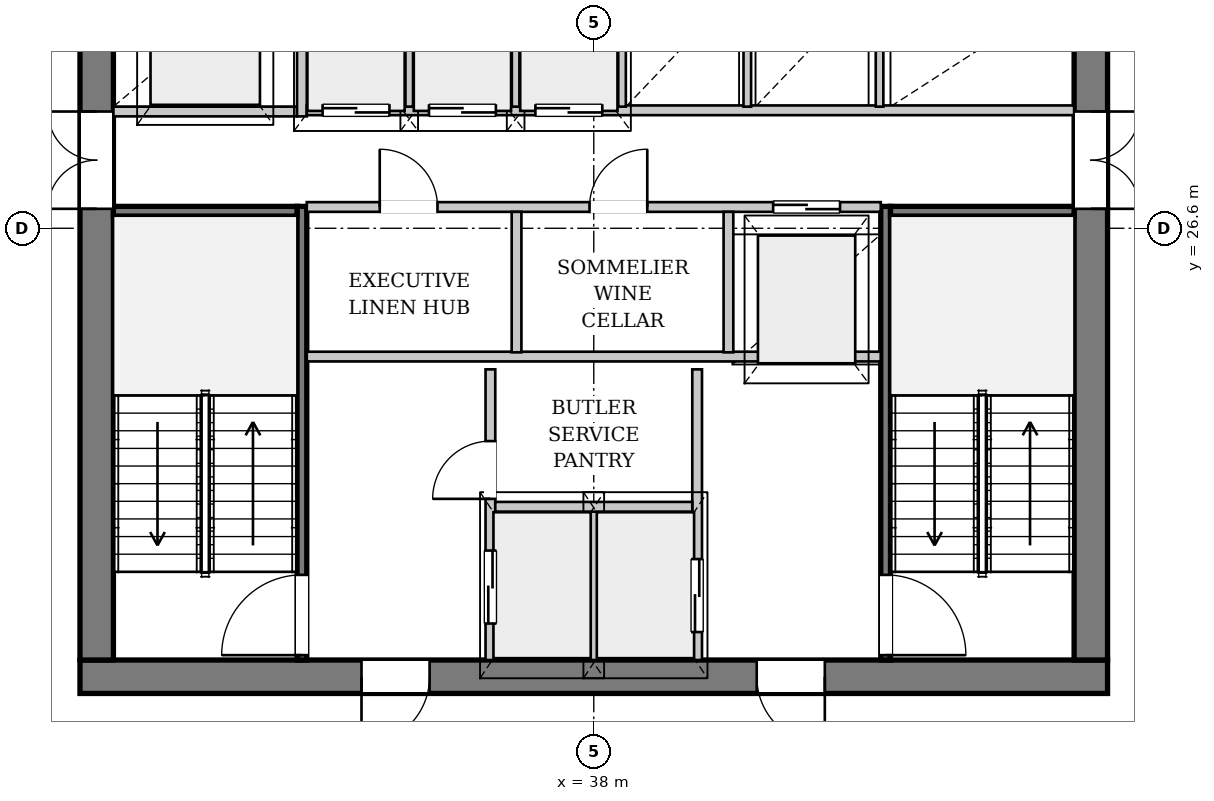
"""IFC4 building model, lengths in metres.
Left out: names, types, materials, properties, quantities, classifications, styles, units other than length and angle.
Written with IfcOpenShell. Run it as: python <this file> out.ifc"""

import sys

from ifc_helpers import new_model, si_unit, direction, frame, frame_2d, origin, place, context, subcontext, project, spatial, rectangle, extrude, source, transform, mapped, element, fill, save


model = new_model("IFC4")
c1 = context("Model", 3, precision=1e-05, world=origin(), true_north=direction((0.0, 1.0)))
c2 = subcontext(c1, "Body", "Model", "MODEL_VIEW")
j1 = project(units=[si_unit("LENGTHUNIT", "METRE"), si_unit("PLANEANGLEUNIT", "RADIAN")], contexts=[c1])
p1 = place(None, origin())
s1 = spatial("IfcSite", under=j1, at=p1, CompositionType="ELEMENT")
p2 = place(p1, origin())
s2 = spatial("IfcBuilding", under=s1, at=p2, CompositionType="ELEMENT")
p3 = place(p2, frame((0.0, 0.0, 167.9)))
s3 = spatial("IfcBuildingStorey", under=s2, at=p3, CompositionType="ELEMENT", Elevation=167.9)
p4 = place(p3, frame((52.97, 20.198, 0.0), z_axis=(0.0, 0.0, 1.0), x_axis=(-0.656914851648, -0.753964772177, 0.0)))
e1 = element("IfcWall", 1, at=p4, inside=s3, PredefinedType="SOLIDWALL", context=c2, shape_type="SweptSolid", body=[
    extrude(rectangle(XDim=23.44, YDim=0.32, at=frame_2d((11.72, 0.0))), origin(), (0.0, 0.0, 1.0), 2.722),
])
p5 = place(p4, frame((6.751, 0.0, 0.0)))
e2 = element("IfcOpeningElement", 2, at=p5, cuts=e1, PredefinedType="OPENING", context=c2, shape_type="SweptSolid", body=[
    extrude(rectangle(XDim=1.5, YDim=2.3, at=frame_2d((0.75, 1.15))), frame((0.0, 0.17, 0.0), z_axis=(0.0, -1.0, 0.0), x_axis=(1.0, 0.0, 0.0)), (0.0, 0.0, 1.0), 0.34),
])
p6 = place(p4, frame((17.646, 0.0, 0.252)))
e3 = element("IfcOpeningElement", 3, at=p6, cuts=e1, PredefinedType="OPENING", context=c2, shape_type="SweptSolid", body=[
    extrude(rectangle(XDim=2.6, YDim=2.35, at=frame_2d((1.3, 1.175))), frame((0.0, 0.17, 0.0), z_axis=(0.0, -1.0, 0.0), x_axis=(1.0, 0.0, 0.0)), (0.0, 0.0, 1.0), 0.34),
])
p7 = place(p3, frame((46.45, 19.225, 0.0), z_axis=(0.0, 0.0, 1.0), x_axis=(-1.0, 0.0, 0.0)))
e4 = element("IfcWall", 4, at=p7, inside=s3, PredefinedType="SHEAR", context=c2, shape_type="SweptSolid", body=[
    extrude(rectangle(XDim=16.9, YDim=0.55, at=frame_2d((8.45, 0.0))), origin(), (0.0, 0.0, 1.0), 3.33),
])
p8 = place(p7, frame((4.65, 0.0, 0.0)))
e5 = element("IfcOpeningElement", 5, at=p8, cuts=e4, PredefinedType="OPENING", context=c2, shape_type="SweptSolid", body=[
    extrude(rectangle(XDim=1.12, YDim=2.25, at=frame_2d((0.56, 1.125))), frame((0.0, 0.285, 0.0), z_axis=(0.0, -1.0, 0.0), x_axis=(1.0, 0.0, 0.0)), (0.0, 0.0, 1.0), 0.57),
])
p9 = place(p7, frame((11.15, 0.0, 0.0)))
e6 = element("IfcOpeningElement", 6, at=p9, cuts=e4, PredefinedType="OPENING", context=c2, shape_type="SweptSolid", body=[
    extrude(rectangle(XDim=1.12, YDim=2.25, at=frame_2d((0.56, 1.125))), frame((0.0, 0.285, 0.0), z_axis=(0.0, -1.0, 0.0), x_axis=(1.0, 0.0, 0.0)), (0.0, 0.0, 1.0), 0.57),
])
p10 = place(p3, frame((29.825, 19.5, 0.0), z_axis=(0.0, 0.0, 1.0), x_axis=(0.0, 1.0, 0.0)))
e7 = element("IfcWall", 7, at=p10, inside=s3, PredefinedType="SHEAR", context=c2, shape_type="SweptSolid", body=[
    extrude(rectangle(XDim=14.2, YDim=0.55, at=frame_2d((7.1, 0.0))), origin(), (0.0, 0.0, 1.0), 3.33),
])
p11 = place(p10, frame((7.42, 0.0, 0.0)))
e8 = element("IfcOpeningElement", 8, at=p11, cuts=e7, PredefinedType="OPENING", context=c2, shape_type="SweptSolid", body=[
    extrude(rectangle(XDim=1.6, YDim=2.2, at=frame_2d((0.8, 1.1))), frame((0.0, 0.285, 0.0), z_axis=(0.0, -1.0, 0.0), x_axis=(1.0, 0.0, 0.0)), (0.0, 0.0, 1.0), 0.57),
])
p12 = place(p3, frame((46.175, 33.7, 0.0), z_axis=(0.0, 0.0, 1.0), x_axis=(0.0, -1.0, 0.0)))
e9 = element("IfcWall", 9, at=p12, inside=s3, PredefinedType="SHEAR", context=c2, shape_type="SweptSolid", body=[
    extrude(rectangle(XDim=14.2, YDim=0.55, at=frame_2d((7.1, 0.0))), origin(), (0.0, 0.0, 1.0), 3.33),
])
p13 = place(p12, frame((5.18, 0.0, 0.0)))
e10 = element("IfcOpeningElement", 10, at=p13, cuts=e9, PredefinedType="OPENING", context=c2, shape_type="SweptSolid", body=[
    extrude(rectangle(XDim=1.6, YDim=2.2, at=frame_2d((0.8, 1.1))), frame((0.0, 0.285, 0.0), z_axis=(0.0, -1.0, 0.0), x_axis=(1.0, 0.0, 0.0)), (0.0, 0.0, 1.0), 0.57),
])
p14 = place(p12, frame((2.05, 0.0, 0.0)))
e11 = element("IfcOpeningElement", 11, at=p14, cuts=e9, PredefinedType="OPENING", context=c2, shape_type="SweptSolid", body=[
    extrude(rectangle(XDim=0.95, YDim=2.1, at=frame_2d((0.475, 1.05))), frame((0.0, 0.285, 0.0), z_axis=(0.0, -1.0, 0.0), x_axis=(1.0, 0.0, 0.0)), (0.0, 0.0, 1.0), 0.57),
])
p15 = place(p3, frame((33.2, 19.5, 0.0), z_axis=(0.0, 0.0, 1.0), x_axis=(0.0, 1.0, 0.0)))
e12 = element("IfcWall", 12, at=p15, inside=s3, PredefinedType="PARTITIONING", context=c2, shape_type="SweptSolid", body=[
    extrude(rectangle(XDim=7.46, YDim=0.16, at=frame_2d((3.73, 0.0))), origin(), (0.0, 0.0, 1.0), 3.33),
])
p16 = place(p15, frame((0.08, 0.0, 0.0)))
e13 = element("IfcOpeningElement", 13, at=p16, cuts=e12, PredefinedType="OPENING", context=c2, shape_type="SweptSolid", body=[
    extrude(rectangle(XDim=1.32, YDim=2.2, at=frame_2d((0.66, 1.1))), frame((0.0, 0.09, 0.0), z_axis=(0.0, -1.0, 0.0), x_axis=(1.0, 0.0, 0.0)), (0.0, 0.0, 1.0), 0.18),
])
p17 = place(p3, frame((30.1, 26.88, 0.0), z_axis=(0.0, 0.0, 1.0), x_axis=(1.0, 0.0, 0.0)))
e14 = element("IfcWall", 14, at=p17, inside=s3, PredefinedType="PARTITIONING", context=c2, shape_type="SweptSolid", body=[
    extrude(rectangle(XDim=3.02, YDim=0.16, at=frame_2d((1.51, 0.0))), origin(), (0.0, 0.0, 1.0), 3.33),
])
p18 = place(p3, frame((42.8, 26.96, 0.0), z_axis=(0.0, 0.0, 1.0), x_axis=(0.0, -1.0, 0.0)))
e15 = element("IfcWall", 15, at=p18, inside=s3, PredefinedType="PARTITIONING", context=c2, shape_type="SweptSolid", body=[
    extrude(rectangle(XDim=7.46, YDim=0.16, at=frame_2d((3.73, 0.0))), origin(), (0.0, 0.0, 1.0), 3.33),
])
p19 = place(p18, frame((6.06, 0.0, 0.0)))
e16 = element("IfcOpeningElement", 16, at=p19, cuts=e15, PredefinedType="OPENING", context=c2, shape_type="SweptSolid", body=[
    extrude(rectangle(XDim=1.32, YDim=2.2, at=frame_2d((0.66, 1.1))), frame((0.0, 0.09, 0.0), z_axis=(0.0, -1.0, 0.0), x_axis=(1.0, 0.0, 0.0)), (0.0, 0.0, 1.0), 0.18),
])
p20 = place(p3, frame((42.88, 26.88, 0.0), z_axis=(0.0, 0.0, 1.0), x_axis=(1.0, 0.0, 0.0)))
e17 = element("IfcWall", 17, at=p20, inside=s3, PredefinedType="PARTITIONING", context=c2, shape_type="SweptSolid", body=[
    extrude(rectangle(XDim=3.02, YDim=0.16, at=frame_2d((1.51, 0.0))), origin(), (0.0, 0.0, 1.0), 3.33),
])
p21 = place(p3, frame((36.3, 19.5, 0.0), z_axis=(0.0, 0.0, 1.0), x_axis=(0.0, 1.0, 0.0)))
e18 = element("IfcWall", 18, at=p21, inside=s3, PredefinedType="PARTITIONING", context=c2, shape_type="SweptSolid", body=[
    extrude(rectangle(XDim=4.78, YDim=0.16, at=frame_2d((2.39, 0.0))), origin(), (0.0, 0.0, 1.0), 3.33),
])
p22 = place(p21, frame((0.6, 0.0, 0.0)))
e19 = element("IfcOpeningElement", 19, at=p22, cuts=e18, PredefinedType="OPENING", context=c2, shape_type="SweptSolid", body=[
    extrude(rectangle(XDim=1.2, YDim=2.2, at=frame_2d((0.6, 1.1))), frame((0.0, 0.09, 0.0), z_axis=(0.0, -1.0, 0.0), x_axis=(1.0, 0.0, 0.0)), (0.0, 0.0, 1.0), 0.18),
])
p23 = place(p21, frame((2.65, 0.0, 0.0)))
e20 = element("IfcOpeningElement", 20, at=p23, cuts=e18, PredefinedType="OPENING", context=c2, shape_type="SweptSolid", body=[
    extrude(rectangle(XDim=0.95, YDim=2.1, at=frame_2d((0.475, 1.05))), frame((0.0, 0.09, 0.0), z_axis=(0.0, -1.0, 0.0), x_axis=(1.0, 0.0, 0.0)), (0.0, 0.0, 1.0), 0.18),
])
p24 = place(p3, frame((39.7, 24.28, 0.0), z_axis=(0.0, 0.0, 1.0), x_axis=(0.0, -1.0, 0.0)))
e21 = element("IfcWall", 21, at=p24, inside=s3, PredefinedType="PARTITIONING", context=c2, shape_type="SweptSolid", body=[
    extrude(rectangle(XDim=4.78, YDim=0.16, at=frame_2d((2.39, 0.0))), origin(), (0.0, 0.0, 1.0), 3.33),
])
p25 = place(p24, frame((3.12, 0.0, 0.0)))
e22 = element("IfcOpeningElement", 22, at=p25, cuts=e21, PredefinedType="OPENING", context=c2, shape_type="SweptSolid", body=[
    extrude(rectangle(XDim=1.2, YDim=2.2, at=frame_2d((0.6, 1.1))), frame((0.0, 0.09, 0.0), z_axis=(0.0, -1.0, 0.0), x_axis=(1.0, 0.0, 0.0)), (0.0, 0.0, 1.0), 0.18),
])
p26 = place(p3, frame((38.0, 19.5, 0.0), z_axis=(0.0, 0.0, 1.0), x_axis=(0.0, 1.0, 0.0)))
e23 = element("IfcWall", 23, at=p26, inside=s3, PredefinedType="PARTITIONING", context=c2, shape_type="SweptSolid", body=[
    extrude(rectangle(XDim=2.46, YDim=0.125, at=frame_2d((1.23, 0.0))), origin(), (0.0, 0.0, 1.0), 3.33),
])
p27 = place(p3, frame((36.38, 22.02, 0.0), z_axis=(0.0, 0.0, 1.0), x_axis=(1.0, 0.0, 0.0)))
e24 = element("IfcWall", 24, at=p27, inside=s3, PredefinedType="PARTITIONING", context=c2, shape_type="SweptSolid", body=[
    extrude(rectangle(XDim=3.24, YDim=0.16, at=frame_2d((1.62, 0.0))), origin(), (0.0, 0.0, 1.0), 3.33),
])
p28 = place(p3, frame((33.28, 24.49, 0.0), z_axis=(0.0, 0.0, 1.0), x_axis=(1.0, 0.0, 0.0)))
e25 = element("IfcWall", 25, at=p28, inside=s3, PredefinedType="PARTITIONING", context=c2, shape_type="SweptSolid", body=[
    extrude(rectangle(XDim=9.44, YDim=0.16, at=frame_2d((4.72, 0.0))), origin(), (0.0, 0.0, 1.0), 3.33),
])
p29 = place(p3, frame((30.1, 28.52, 0.0), z_axis=(0.0, 0.0, 1.0), x_axis=(1.0, 0.0, 0.0)))
e26 = element("IfcWall", 26, at=p29, inside=s3, PredefinedType="PARTITIONING", context=c2, shape_type="SweptSolid", body=[
    extrude(rectangle(XDim=3.02, YDim=0.16, at=frame_2d((1.51, 0.0))), origin(), (0.0, 0.0, 1.0), 3.33),
])
p30 = place(p3, frame((33.2, 28.44, 0.0), z_axis=(0.0, 0.0, 1.0), x_axis=(0.0, 1.0, 0.0)))
e27 = element("IfcWall", 27, at=p30, inside=s3, PredefinedType="PARTITIONING", context=c2, shape_type="SweptSolid", body=[
    extrude(rectangle(XDim=5.26, YDim=0.16, at=frame_2d((2.63, 0.0))), origin(), (0.0, 0.0, 1.0), 3.33),
])
p31 = place(p3, frame((33.28, 26.95, 0.0), z_axis=(0.0, 0.0, 1.0), x_axis=(1.0, 0.0, 0.0)))
e28 = element("IfcWall", 28, at=p31, inside=s3, PredefinedType="PARTITIONING", context=c2, shape_type="SweptSolid", body=[
    extrude(rectangle(XDim=9.44, YDim=0.16, at=frame_2d((4.72, 0.0))), origin(), (0.0, 0.0, 1.0), 3.33),
])
p32 = place(p31, frame((1.2, 0.0, 0.0)))
e29 = element("IfcOpeningElement", 29, at=p32, cuts=e28, PredefinedType="OPENING", context=c2, shape_type="SweptSolid", body=[
    extrude(rectangle(XDim=0.95, YDim=2.1, at=frame_2d((0.475, 1.05))), frame((0.0, 0.09, 0.0), z_axis=(0.0, -1.0, 0.0), x_axis=(1.0, 0.0, 0.0)), (0.0, 0.0, 1.0), 0.18),
])
p33 = place(p31, frame((4.65, 0.0, 0.0)))
e30 = element("IfcOpeningElement", 30, at=p33, cuts=e28, PredefinedType="OPENING", context=c2, shape_type="SweptSolid", body=[
    extrude(rectangle(XDim=0.95, YDim=2.1, at=frame_2d((0.475, 1.05))), frame((0.0, 0.09, 0.0), z_axis=(0.0, -1.0, 0.0), x_axis=(1.0, 0.0, 0.0)), (0.0, 0.0, 1.0), 0.18),
])
p34 = place(p31, frame((7.67, 0.0, 0.0)))
e31 = element("IfcOpeningElement", 31, at=p34, cuts=e28, PredefinedType="OPENING", context=c2, shape_type="SweptSolid", body=[
    extrude(rectangle(XDim=1.1, YDim=2.2, at=frame_2d((0.55, 1.1))), frame((0.0, 0.09, 0.0), z_axis=(0.0, -1.0, 0.0), x_axis=(1.0, 0.0, 0.0)), (0.0, 0.0, 1.0), 0.18),
])
for number, where, z_axis, x_axis in (
    (32, (36.73, 24.56, 0.0), (0.0, 0.0, 1.0), (0.0, 1.0, 0.0)),
    (33, (40.215, 24.56, 0.0), (0.0, 0.0, 1.0), (0.0, 1.0, 0.0)),
):
    element("IfcWall", number, at=place(p3, frame(where, z_axis=z_axis, x_axis=x_axis)), inside=s3, PredefinedType="PARTITIONING", context=c2, shape_type="SweptSolid", body=[
        extrude(rectangle(XDim=2.31, YDim=0.16, at=frame_2d((1.155, 0.0))), origin(), (0.0, 0.0, 1.0), 3.33),
    ])
p35 = place(p3, frame((33.28, 28.54, 0.0), z_axis=(0.0, 0.0, 1.0), x_axis=(1.0, 0.0, 0.0)))
e34 = element("IfcWall", 34, at=p35, inside=s3, PredefinedType="PARTITIONING", context=c2, shape_type="SweptSolid", body=[
    extrude(rectangle(XDim=12.62, YDim=0.16, at=frame_2d((6.31, 0.0))), origin(), (0.0, 0.0, 1.0), 3.33),
])
p36 = place(p35, frame((0.26, 0.0, 0.0)))
e35 = element("IfcOpeningElement", 35, at=p36, cuts=e34, PredefinedType="OPENING", context=c2, shape_type="SweptSolid", body=[
    extrude(rectangle(XDim=1.1, YDim=2.2, at=frame_2d((0.55, 1.1))), frame((0.0, 0.09, 0.0), z_axis=(0.0, -1.0, 0.0), x_axis=(1.0, 0.0, 0.0)), (0.0, 0.0, 1.0), 0.18),
])
p37 = place(p35, frame((2.01, 0.0, 0.0)))
e36 = element("IfcOpeningElement", 36, at=p37, cuts=e34, PredefinedType="OPENING", context=c2, shape_type="SweptSolid", body=[
    extrude(rectangle(XDim=1.1, YDim=2.2, at=frame_2d((0.55, 1.1))), frame((0.0, 0.09, 0.0), z_axis=(0.0, -1.0, 0.0), x_axis=(1.0, 0.0, 0.0)), (0.0, 0.0, 1.0), 0.18),
])
p38 = place(p35, frame((3.76, 0.0, 0.0)))
e37 = element("IfcOpeningElement", 37, at=p38, cuts=e34, PredefinedType="OPENING", context=c2, shape_type="SweptSolid", body=[
    extrude(rectangle(XDim=1.1, YDim=2.2, at=frame_2d((0.55, 1.1))), frame((0.0, 0.09, 0.0), z_axis=(0.0, -1.0, 0.0), x_axis=(1.0, 0.0, 0.0)), (0.0, 0.0, 1.0), 0.18),
])
for number, where, z_axis, x_axis in (
    (38, (34.965, 28.6, 0.0), (0.0, 0.0, 1.0), (0.0, 1.0, 0.0)),
    (39, (36.715, 28.6, 0.0), (0.0, 0.0, 1.0), (0.0, 1.0, 0.0)),
    (40, (38.465, 28.6, 0.0), (0.0, 0.0, 1.0), (0.0, 1.0, 0.0)),
    (41, (40.525, 28.6, 0.0), (0.0, 0.0, 1.0), (0.0, 1.0, 0.0)),
    (42, (42.7, 28.6, 0.0), (0.0, 0.0, 1.0), (0.0, 1.0, 0.0)),
):
    element("IfcWall", number, at=place(p3, frame(where, z_axis=z_axis, x_axis=x_axis)), inside=s3, PredefinedType="PARTITIONING", context=c2, shape_type="SweptSolid", body=[
        extrude(rectangle(XDim=1.92, YDim=0.125, at=frame_2d((0.96, 0.0))), origin(), (0.0, 0.0, 1.0), 3.33),
    ])
m1 = source(origin(), c2, "Body", "SweptSolid", [
    extrude(rectangle(XDim=1.12, YDim=2.25, at=frame_2d((0.56, 1.125))), frame((0.0, 0.025, 0.0), z_axis=(0.0, -1.0, 0.0), x_axis=(1.0, 0.0, 0.0)), (0.0, 0.0, 1.0), 0.05),
])
p39 = place(p8, origin())
e43 = element("IfcDoor", 43, at=p39, inside=s3, OperationType="SINGLE_SWING_LEFT", PredefinedType="DOOR", context=c2, shape_type="MappedRepresentation", body=[
    mapped(m1, transform((0.0, 0.0, 0.0), x_axis=(1.0, 0.0, 0.0), y_axis=(0.0, 1.0, 0.0), z_axis=(0.0, 0.0, 1.0), scale=1.0)),
])
fill(e5, e43)
p40 = place(p9, origin())
e44 = element("IfcDoor", 44, at=p40, inside=s3, OperationType="SINGLE_SWING_RIGHT", PredefinedType="DOOR", context=c2, shape_type="MappedRepresentation", body=[
    mapped(m1, transform((0.0, 0.0, 0.0), x_axis=(1.0, 0.0, 0.0), y_axis=(0.0, 1.0, 0.0), z_axis=(0.0, 0.0, 1.0), scale=1.0)),
])
fill(e6, e44)
m2 = source(origin(), c2, "Body", "SweptSolid", [
    extrude(rectangle(XDim=1.6, YDim=2.2, at=frame_2d((0.8, 1.1))), frame((0.0, 0.025, 0.0), z_axis=(0.0, -1.0, 0.0), x_axis=(1.0, 0.0, 0.0)), (0.0, 0.0, 1.0), 0.05),
])
p41 = place(p11, origin())
e45 = element("IfcDoor", 45, at=p41, inside=s3, OperationType="DOUBLE_DOOR_SINGLE_SWING", PredefinedType="DOOR", context=c2, shape_type="MappedRepresentation", body=[
    mapped(m2, transform((0.0, 0.0, 0.0), x_axis=(1.0, 0.0, 0.0), y_axis=(0.0, 1.0, 0.0), z_axis=(0.0, 0.0, 1.0), scale=1.0)),
])
fill(e8, e45)
p42 = place(p13, origin())
e46 = element("IfcDoor", 46, at=p42, inside=s3, OperationType="DOUBLE_DOOR_SINGLE_SWING", PredefinedType="DOOR", context=c2, shape_type="MappedRepresentation", body=[
    mapped(m2, transform((0.0, 0.0, 0.0), x_axis=(1.0, 0.0, 0.0), y_axis=(0.0, 1.0, 0.0), z_axis=(0.0, 0.0, 1.0), scale=1.0)),
])
fill(e10, e46)
m3 = source(origin(), c2, "Body", "SweptSolid", [
    extrude(rectangle(XDim=1.32, YDim=2.2, at=frame_2d((0.66, 1.1))), frame((0.0, 0.025, 0.0), z_axis=(0.0, -1.0, 0.0), x_axis=(1.0, 0.0, 0.0)), (0.0, 0.0, 1.0), 0.05),
])
p43 = place(p16, origin())
e47 = element("IfcDoor", 47, at=p43, inside=s3, OperationType="SINGLE_SWING_LEFT", PredefinedType="DOOR", context=c2, shape_type="MappedRepresentation", body=[
    mapped(m3, transform((0.0, 0.0, 0.0), x_axis=(1.0, 0.0, 0.0), y_axis=(0.0, 1.0, 0.0), z_axis=(0.0, 0.0, 1.0), scale=1.0)),
])
fill(e13, e47)
p44 = place(p19, origin())
e48 = element("IfcDoor", 48, at=p44, inside=s3, OperationType="SINGLE_SWING_RIGHT", PredefinedType="DOOR", context=c2, shape_type="MappedRepresentation", body=[
    mapped(m3, transform((0.0, 0.0, 0.0), x_axis=(1.0, 0.0, 0.0), y_axis=(0.0, 1.0, 0.0), z_axis=(0.0, 0.0, 1.0), scale=1.0)),
])
fill(e16, e48)
m4 = source(origin(), c2, "Body", "SweptSolid", [
    extrude(rectangle(XDim=1.2, YDim=2.2, at=frame_2d((0.6, 1.1))), frame((0.0, 0.025, 0.0), z_axis=(0.0, -1.0, 0.0), x_axis=(1.0, 0.0, 0.0)), (0.0, 0.0, 1.0), 0.05),
])
p45 = place(p22, origin())
e49 = element("IfcDoor", 49, at=p45, inside=s3, OperationType="DOUBLE_DOOR_SLIDING", PredefinedType="DOOR", context=c2, shape_type="MappedRepresentation", body=[
    mapped(m4, transform((0.0, 0.0, 0.0), x_axis=(1.0, 0.0, 0.0), y_axis=(0.0, 1.0, 0.0), z_axis=(0.0, 0.0, 1.0), scale=1.0)),
])
fill(e19, e49)
m5 = source(origin(), c2, "Body", "SweptSolid", [
    extrude(rectangle(XDim=0.95, YDim=2.1, at=frame_2d((0.475, 1.05))), frame((0.0, 0.025, 0.0), z_axis=(0.0, -1.0, 0.0), x_axis=(1.0, 0.0, 0.0)), (0.0, 0.0, 1.0), 0.05),
])
p46 = place(p23, origin())
e50 = element("IfcDoor", 50, at=p46, inside=s3, OperationType="SINGLE_SWING_LEFT", PredefinedType="DOOR", context=c2, shape_type="MappedRepresentation", body=[
    mapped(m5, transform((0.0, 0.0, 0.0), x_axis=(1.0, 0.0, 0.0), y_axis=(0.0, 1.0, 0.0), z_axis=(0.0, 0.0, 1.0), scale=1.0)),
])
fill(e20, e50)
p47 = place(p25, origin())
e51 = element("IfcDoor", 51, at=p47, inside=s3, OperationType="DOUBLE_DOOR_SLIDING", PredefinedType="DOOR", context=c2, shape_type="MappedRepresentation", body=[
    mapped(m4, transform((0.0, 0.0, 0.0), x_axis=(1.0, 0.0, 0.0), y_axis=(0.0, 1.0, 0.0), z_axis=(0.0, 0.0, 1.0), scale=1.0)),
])
fill(e22, e51)
p48 = place(p32, origin())
e52 = element("IfcDoor", 52, at=p48, inside=s3, OperationType="SINGLE_SWING_LEFT", PredefinedType="DOOR", context=c2, shape_type="MappedRepresentation", body=[
    mapped(m5, transform((0.0, 0.0, 0.0), x_axis=(1.0, 0.0, 0.0), y_axis=(0.0, 1.0, 0.0), z_axis=(0.0, 0.0, 1.0), scale=1.0)),
])
fill(e29, e52)
p49 = place(p33, origin())
e53 = element("IfcDoor", 53, at=p49, inside=s3, OperationType="SINGLE_SWING_RIGHT", PredefinedType="DOOR", context=c2, shape_type="MappedRepresentation", body=[
    mapped(m5, transform((0.0, 0.0, 0.0), x_axis=(1.0, 0.0, 0.0), y_axis=(0.0, 1.0, 0.0), z_axis=(0.0, 0.0, 1.0), scale=1.0)),
])
fill(e30, e53)
m6 = source(origin(), c2, "Body", "SweptSolid", [
    extrude(rectangle(XDim=1.1, YDim=2.2, at=frame_2d((0.55, 1.1))), frame((0.0, 0.025, 0.0), z_axis=(0.0, -1.0, 0.0), x_axis=(1.0, 0.0, 0.0)), (0.0, 0.0, 1.0), 0.05),
])
p50 = place(p34, origin())
e54 = element("IfcDoor", 54, at=p50, inside=s3, OperationType="DOUBLE_DOOR_SLIDING", PredefinedType="DOOR", context=c2, shape_type="MappedRepresentation", body=[
    mapped(m6, transform((0.0, 0.0, 0.0), x_axis=(1.0, 0.0, 0.0), y_axis=(0.0, 1.0, 0.0), z_axis=(0.0, 0.0, 1.0), scale=1.0)),
])
fill(e31, e54)
p51 = place(p36, origin())
e55 = element("IfcDoor", 55, at=p51, inside=s3, OperationType="DOUBLE_DOOR_SLIDING", PredefinedType="DOOR", context=c2, shape_type="MappedRepresentation", body=[
    mapped(m6, transform((0.0, 0.0, 0.0), x_axis=(1.0, 0.0, 0.0), y_axis=(0.0, 1.0, 0.0), z_axis=(0.0, 0.0, 1.0), scale=1.0)),
])
fill(e35, e55)
p52 = place(p37, origin())
e56 = element("IfcDoor", 56, at=p52, inside=s3, OperationType="DOUBLE_DOOR_SLIDING", PredefinedType="DOOR", context=c2, shape_type="MappedRepresentation", body=[
    mapped(m6, transform((0.0, 0.0, 0.0), x_axis=(1.0, 0.0, 0.0), y_axis=(0.0, 1.0, 0.0), z_axis=(0.0, 0.0, 1.0), scale=1.0)),
])
fill(e36, e56)
p53 = place(p38, origin())
e57 = element("IfcDoor", 57, at=p53, inside=s3, OperationType="DOUBLE_DOOR_SLIDING", PredefinedType="DOOR", context=c2, shape_type="MappedRepresentation", body=[
    mapped(m6, transform((0.0, 0.0, 0.0), x_axis=(1.0, 0.0, 0.0), y_axis=(0.0, 1.0, 0.0), z_axis=(0.0, 0.0, 1.0), scale=1.0)),
])
fill(e37, e57)
save(model, sys.argv[1])
